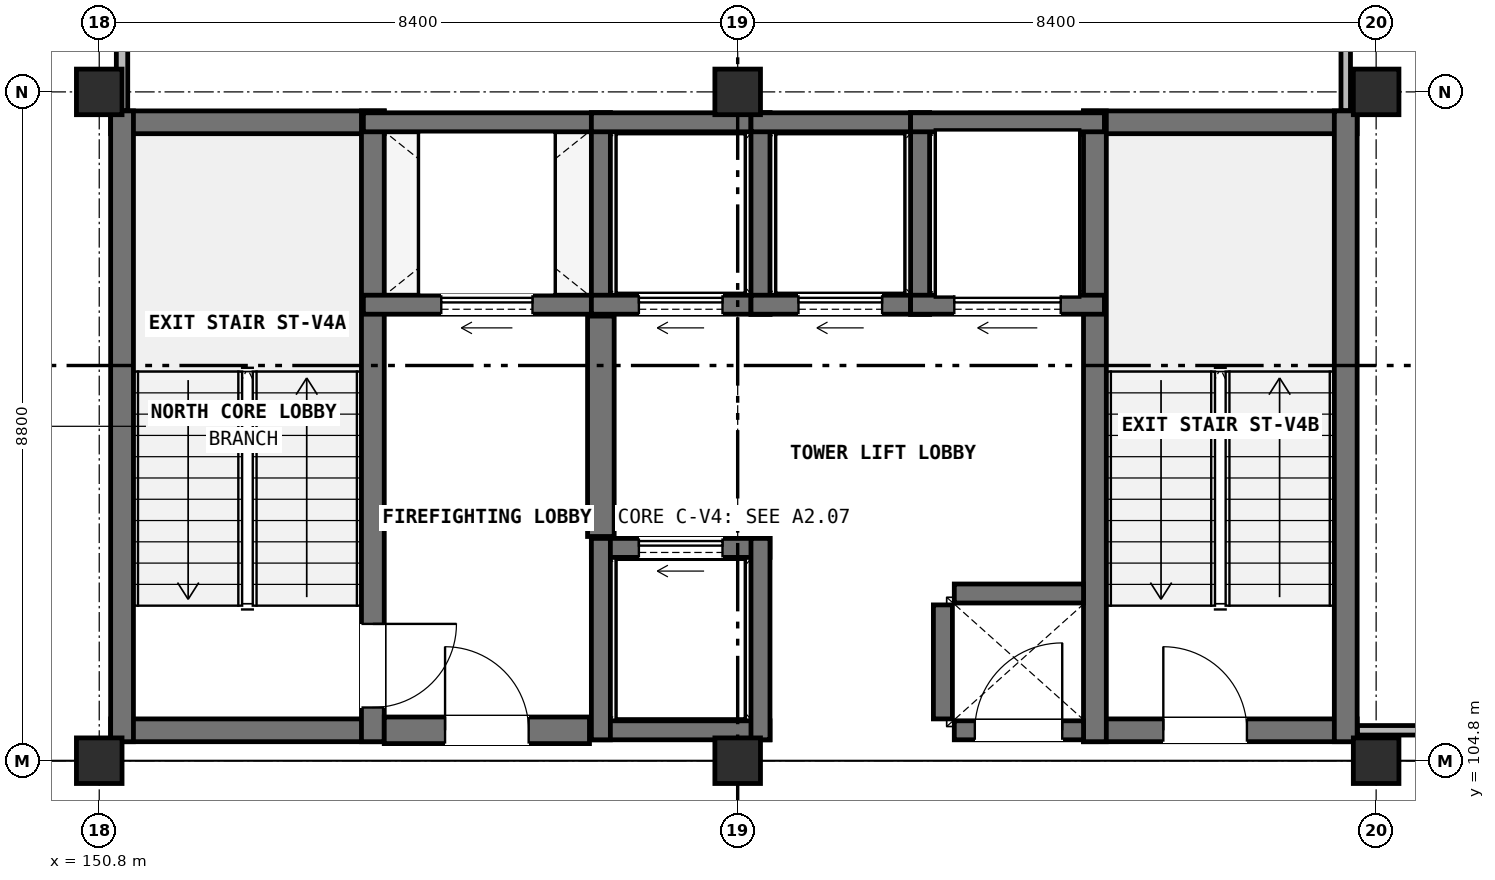
"""IFC4 building model, lengths in metres.
Left out: names, types, materials, properties, quantities, classifications, styles, units other than length and angle.
Written with IfcOpenShell. Run it as: python <this file> out.ifc"""

import sys

from ifc_helpers import new_model, si_unit, direction, frame, frame_2d, origin, origin_2d, place, context, subcontext, project, spatial, rectangle, extrude, element, fill, save


model = new_model("IFC4")
c1 = context("Model", 3, precision=1e-05, world=origin(), true_north=direction((0.0, 1.0)))
c2 = subcontext(c1, "Body", "Model", "MODEL_VIEW")
j1 = project(units=[si_unit("LENGTHUNIT", "METRE"), si_unit("PLANEANGLEUNIT", "RADIAN")], contexts=[c1])
p1 = place(None, origin())
s1 = spatial("IfcSite", under=j1, at=p1, CompositionType="ELEMENT")
p2 = place(p1, origin())
s2 = spatial("IfcBuilding", under=s1, at=p2, CompositionType="ELEMENT")
p3 = place(p2, frame((0.0, 0.0, 48.2)))
s3 = spatial("IfcBuildingStorey", under=s2, at=p3, CompositionType="ELEMENT", Elevation=48.2)
for number, where, z_axis, x_axis in (
    (1, (150.8, 104.8, 0.0), (0.0, 0.0, 1.0), (1.0, 0.0, 0.0)),
    (2, (150.8, 113.6, 0.0), (0.0, 0.0, 1.0), (1.0, 0.0, 0.0)),
    (3, (159.2, 104.8, 0.0), (0.0, 0.0, 1.0), (1.0, 0.0, 0.0)),
    (4, (159.2, 113.6, 0.0), (0.0, 0.0, 1.0), (1.0, 0.0, 0.0)),
    (5, (167.6, 104.8, 0.0), (0.0, 0.0, 1.0), (1.0, 0.0, 0.0)),
    (6, (167.6, 113.6, 0.0), (0.0, 0.0, 1.0), (1.0, 0.0, 0.0)),
):
    element("IfcColumn", number, at=place(p3, frame(where, z_axis=z_axis, x_axis=x_axis)), inside=s3, PredefinedType="COLUMN", context=c2, shape_type="SweptSolid", body=[
        extrude(rectangle(XDim=0.6, YDim=0.6, at=origin_2d()), origin(), (0.0, 0.0, 1.0), 4.0),
    ])
for number, where, z_axis, x_axis in (
    (7, (150.95, 105.2, 0.0), (0.0, 0.0, 1.0), (1.0, 0.0, 0.0)),
    (8, (150.95, 113.2, 0.0), (0.0, 0.0, 1.0), (1.0, 0.0, 0.0)),
):
    element("IfcWall", number, at=place(p3, frame(where, z_axis=z_axis, x_axis=x_axis)), inside=s3, PredefinedType="SHEAR", context=c2, shape_type="SweptSolid", body=[
        extrude(rectangle(XDim=3.6, YDim=0.3, at=frame_2d((1.8, 0.0))), origin(), (0.0, 0.0, 1.0), 4.0),
    ])
p4 = place(p3, frame((151.1, 105.05, 0.0), z_axis=(0.0, 0.0, 1.0), x_axis=(0.0, 1.0, 0.0)))
e9 = element("IfcWall", 9, at=p4, inside=s3, PredefinedType="SHEAR", context=c2, shape_type="SweptSolid", body=[
    extrude(rectangle(XDim=8.3, YDim=0.3, at=frame_2d((4.15, 0.0))), origin(), (0.0, 0.0, 1.0), 4.0),
])
p5 = place(p3, frame((154.4, 105.05, 0.0), z_axis=(0.0, 0.0, 1.0), x_axis=(0.0, 1.0, 0.0)))
e10 = element("IfcWall", 10, at=p5, inside=s3, PredefinedType="SHEAR", context=c2, shape_type="SweptSolid", body=[
    extrude(rectangle(XDim=8.3, YDim=0.3, at=frame_2d((4.15, 0.0))), origin(), (0.0, 0.0, 1.0), 4.0),
])
p6 = place(p5, frame((0.45, 0.0, 0.0)))
e11 = element("IfcOpeningElement", 11, at=p6, cuts=e10, PredefinedType="OPENING", context=c2, shape_type="SweptSolid", body=[
    extrude(rectangle(XDim=1.1, YDim=2.2, at=frame_2d((0.55, 1.1))), frame((0.0, 0.16, 0.0), z_axis=(0.0, -1.0, 0.0), x_axis=(1.0, 0.0, 0.0)), (0.0, 0.0, 1.0), 0.32),
])
p7 = place(p3, frame((163.75, 105.2, 0.0), z_axis=(0.0, 0.0, 1.0), x_axis=(1.0, 0.0, 0.0)))
e12 = element("IfcWall", 12, at=p7, inside=s3, PredefinedType="SHEAR", context=c2, shape_type="SweptSolid", body=[
    extrude(rectangle(XDim=3.6, YDim=0.3, at=frame_2d((1.8, 0.0))), origin(), (0.0, 0.0, 1.0), 4.0),
])
p8 = place(p7, frame((1.05, 0.0, 0.0)))
e13 = element("IfcOpeningElement", 13, at=p8, cuts=e12, PredefinedType="OPENING", context=c2, shape_type="SweptSolid", body=[
    extrude(rectangle(XDim=1.1, YDim=2.2, at=frame_2d((0.55, 1.1))), frame((0.0, 0.16, 0.0), z_axis=(0.0, -1.0, 0.0), x_axis=(1.0, 0.0, 0.0)), (0.0, 0.0, 1.0), 0.32),
])
p9 = place(p3, frame((163.75, 113.2, 0.0), z_axis=(0.0, 0.0, 1.0), x_axis=(1.0, 0.0, 0.0)))
e14 = element("IfcWall", 14, at=p9, inside=s3, PredefinedType="SHEAR", context=c2, shape_type="SweptSolid", body=[
    extrude(rectangle(XDim=3.6, YDim=0.3, at=frame_2d((1.8, 0.0))), origin(), (0.0, 0.0, 1.0), 4.0),
])
for number, where, z_axis, x_axis in (
    (15, (163.9, 105.05, 0.0), (0.0, 0.0, 1.0), (0.0, 1.0, 0.0)),
    (16, (167.2, 105.05, 0.0), (0.0, 0.0, 1.0), (0.0, 1.0, 0.0)),
):
    element("IfcWall", number, at=place(p3, frame(where, z_axis=z_axis, x_axis=x_axis)), inside=s3, PredefinedType="SHEAR", context=c2, shape_type="SweptSolid", body=[
        extrude(rectangle(XDim=8.3, YDim=0.3, at=frame_2d((4.15, 0.0))), origin(), (0.0, 0.0, 1.0), 4.0),
    ])
p10 = place(p3, frame((154.275, 110.8, 0.0), z_axis=(0.0, 0.0, 1.0), x_axis=(1.0, 0.0, 0.0)))
e17 = element("IfcWall", 17, at=p10, inside=s3, PredefinedType="SOLIDWALL", context=c2, shape_type="SweptSolid", body=[
    extrude(rectangle(XDim=3.25, YDim=0.25, at=frame_2d((1.625, 0.0))), origin(), (0.0, 0.0, 1.0), 3.68),
])
p11 = place(p10, frame((1.025, 0.0, 0.0)))
e18 = element("IfcOpeningElement", 18, at=p11, cuts=e17, PredefinedType="OPENING", context=c2, shape_type="SweptSolid", body=[
    extrude(rectangle(XDim=1.2, YDim=2.2, at=frame_2d((0.6, 1.1))), frame((0.0, 0.135, 0.0), z_axis=(0.0, -1.0, 0.0), x_axis=(1.0, 0.0, 0.0)), (0.0, 0.0, 1.0), 0.27),
])
p12 = place(p3, frame((154.275, 113.2, 0.0), z_axis=(0.0, 0.0, 1.0), x_axis=(1.0, 0.0, 0.0)))
e19 = element("IfcWall", 19, at=p12, inside=s3, PredefinedType="SOLIDWALL", context=c2, shape_type="SweptSolid", body=[
    extrude(rectangle(XDim=3.25, YDim=0.25, at=frame_2d((1.625, 0.0))), origin(), (0.0, 0.0, 1.0), 3.68),
])
p13 = place(p3, frame((157.4, 110.675, 0.0), z_axis=(0.0, 0.0, 1.0), x_axis=(0.0, 1.0, 0.0)))
e20 = element("IfcWall", 20, at=p13, inside=s3, PredefinedType="SOLIDWALL", context=c2, shape_type="SweptSolid", body=[
    extrude(rectangle(XDim=2.65, YDim=0.25, at=frame_2d((1.325, 0.0))), origin(), (0.0, 0.0, 1.0), 3.68),
])
p14 = place(p3, frame((157.275, 110.8, 0.0), z_axis=(0.0, 0.0, 1.0), x_axis=(1.0, 0.0, 0.0)))
e21 = element("IfcWall", 21, at=p14, inside=s3, PredefinedType="SOLIDWALL", context=c2, shape_type="SweptSolid", body=[
    extrude(rectangle(XDim=2.35, YDim=0.25, at=frame_2d((1.175, 0.0))), origin(), (0.0, 0.0, 1.0), 3.68),
])
p15 = place(p14, frame((0.625, 0.0, 0.0)))
e22 = element("IfcOpeningElement", 22, at=p15, cuts=e21, PredefinedType="OPENING", context=c2, shape_type="SweptSolid", body=[
    extrude(rectangle(XDim=1.1, YDim=2.2, at=frame_2d((0.55, 1.1))), frame((0.0, 0.135, 0.0), z_axis=(0.0, -1.0, 0.0), x_axis=(1.0, 0.0, 0.0)), (0.0, 0.0, 1.0), 0.27),
])
p16 = place(p3, frame((157.275, 113.2, 0.0), z_axis=(0.0, 0.0, 1.0), x_axis=(1.0, 0.0, 0.0)))
e23 = element("IfcWall", 23, at=p16, inside=s3, PredefinedType="SOLIDWALL", context=c2, shape_type="SweptSolid", body=[
    extrude(rectangle(XDim=2.35, YDim=0.25, at=frame_2d((1.175, 0.0))), origin(), (0.0, 0.0, 1.0), 3.68),
])
p17 = place(p3, frame((159.5, 110.675, 0.0), z_axis=(0.0, 0.0, 1.0), x_axis=(0.0, 1.0, 0.0)))
e24 = element("IfcWall", 24, at=p17, inside=s3, PredefinedType="SOLIDWALL", context=c2, shape_type="SweptSolid", body=[
    extrude(rectangle(XDim=2.65, YDim=0.25, at=frame_2d((1.325, 0.0))), origin(), (0.0, 0.0, 1.0), 3.68),
])
p18 = place(p3, frame((159.375, 110.8, 0.0), z_axis=(0.0, 0.0, 1.0), x_axis=(1.0, 0.0, 0.0)))
e25 = element("IfcWall", 25, at=p18, inside=s3, PredefinedType="SOLIDWALL", context=c2, shape_type="SweptSolid", body=[
    extrude(rectangle(XDim=2.35, YDim=0.25, at=frame_2d((1.175, 0.0))), origin(), (0.0, 0.0, 1.0), 3.68),
])
p19 = place(p18, frame((0.625, 0.0, 0.0)))
e26 = element("IfcOpeningElement", 26, at=p19, cuts=e25, PredefinedType="OPENING", context=c2, shape_type="SweptSolid", body=[
    extrude(rectangle(XDim=1.1, YDim=2.2, at=frame_2d((0.55, 1.1))), frame((0.0, 0.135, 0.0), z_axis=(0.0, -1.0, 0.0), x_axis=(1.0, 0.0, 0.0)), (0.0, 0.0, 1.0), 0.27),
])
p20 = place(p3, frame((159.375, 113.2, 0.0), z_axis=(0.0, 0.0, 1.0), x_axis=(1.0, 0.0, 0.0)))
e27 = element("IfcWall", 27, at=p20, inside=s3, PredefinedType="SOLIDWALL", context=c2, shape_type="SweptSolid", body=[
    extrude(rectangle(XDim=2.35, YDim=0.25, at=frame_2d((1.175, 0.0))), origin(), (0.0, 0.0, 1.0), 3.68),
])
p21 = place(p3, frame((161.6, 110.675, 0.0), z_axis=(0.0, 0.0, 1.0), x_axis=(0.0, 1.0, 0.0)))
e28 = element("IfcWall", 28, at=p21, inside=s3, PredefinedType="SOLIDWALL", context=c2, shape_type="SweptSolid", body=[
    extrude(rectangle(XDim=2.65, YDim=0.25, at=frame_2d((1.325, 0.0))), origin(), (0.0, 0.0, 1.0), 3.68),
])
p22 = place(p3, frame((157.275, 105.2, 0.0), z_axis=(0.0, 0.0, 1.0), x_axis=(1.0, 0.0, 0.0)))
e29 = element("IfcWall", 29, at=p22, inside=s3, PredefinedType="SOLIDWALL", context=c2, shape_type="SweptSolid", body=[
    extrude(rectangle(XDim=2.35, YDim=0.25, at=frame_2d((1.175, 0.0))), origin(), (0.0, 0.0, 1.0), 3.68),
])
p23 = place(p3, frame((157.275, 107.6, 0.0), z_axis=(0.0, 0.0, 1.0), x_axis=(1.0, 0.0, 0.0)))
e30 = element("IfcWall", 30, at=p23, inside=s3, PredefinedType="SOLIDWALL", context=c2, shape_type="SweptSolid", body=[
    extrude(rectangle(XDim=2.35, YDim=0.25, at=frame_2d((1.175, 0.0))), origin(), (0.0, 0.0, 1.0), 3.68),
])
p24 = place(p23, frame((0.625, 0.0, 0.0)))
e31 = element("IfcOpeningElement", 31, at=p24, cuts=e30, PredefinedType="OPENING", context=c2, shape_type="SweptSolid", body=[
    extrude(rectangle(XDim=1.1, YDim=2.2, at=frame_2d((0.55, 1.1))), frame((0.0, 0.135, 0.0), z_axis=(0.0, -1.0, 0.0), x_axis=(1.0, 0.0, 0.0)), (0.0, 0.0, 1.0), 0.27),
])
for number, where, z_axis, x_axis in (
    (32, (157.4, 105.075, 0.0), (0.0, 0.0, 1.0), (0.0, 1.0, 0.0)),
    (33, (159.5, 105.075, 0.0), (0.0, 0.0, 1.0), (0.0, 1.0, 0.0)),
):
    element("IfcWall", number, at=place(p3, frame(where, z_axis=z_axis, x_axis=x_axis)), inside=s3, PredefinedType="SOLIDWALL", context=c2, shape_type="SweptSolid", body=[
        extrude(rectangle(XDim=2.65, YDim=0.25, at=frame_2d((1.325, 0.0))), origin(), (0.0, 0.0, 1.0), 3.68),
    ])
p25 = place(p3, frame((161.475, 110.8, 0.0), z_axis=(0.0, 0.0, 1.0), x_axis=(1.0, 0.0, 0.0)))
e34 = element("IfcWall", 34, at=p25, inside=s3, PredefinedType="SOLIDWALL", context=c2, shape_type="SweptSolid", body=[
    extrude(rectangle(XDim=2.55, YDim=0.25, at=frame_2d((1.275, 0.0))), origin(), (0.0, 0.0, 1.0), 3.68),
])
p26 = place(p25, frame((0.575, 0.0, 0.0)))
e35 = element("IfcOpeningElement", 35, at=p26, cuts=e34, PredefinedType="OPENING", context=c2, shape_type="SweptSolid", body=[
    extrude(rectangle(XDim=1.4, YDim=2.3, at=frame_2d((0.7, 1.15))), frame((0.0, 0.135, 0.0), z_axis=(0.0, -1.0, 0.0), x_axis=(1.0, 0.0, 0.0)), (0.0, 0.0, 1.0), 0.27),
])
p27 = place(p3, frame((161.475, 113.2, 0.0), z_axis=(0.0, 0.0, 1.0), x_axis=(1.0, 0.0, 0.0)))
e36 = element("IfcWall", 36, at=p27, inside=s3, PredefinedType="SOLIDWALL", context=c2, shape_type="SweptSolid", body=[
    extrude(rectangle(XDim=2.55, YDim=0.25, at=frame_2d((1.275, 0.0))), origin(), (0.0, 0.0, 1.0), 3.68),
])
p28 = place(p3, frame((157.4, 107.75, 0.0), z_axis=(0.0, 0.0, 1.0), x_axis=(0.0, 1.0, 0.0)))
e37 = element("IfcWall", 37, at=p28, inside=s3, PredefinedType="SHEAR", context=c2, shape_type="SweptSolid", body=[
    extrude(rectangle(XDim=2.9, YDim=0.35, at=frame_2d((1.45, 0.0))), origin(), (0.0, 0.0, 1.0), 3.68),
])
p29 = place(p3, frame((154.55, 105.2, 0.0), z_axis=(0.0, 0.0, 1.0), x_axis=(1.0, 0.0, 0.0)))
e38 = element("IfcWall", 38, at=p29, inside=s3, PredefinedType="SHEAR", context=c2, shape_type="SweptSolid", body=[
    extrude(rectangle(XDim=2.7, YDim=0.35, at=frame_2d((1.35, 0.0))), origin(), (0.0, 0.0, 1.0), 3.68),
])
p30 = place(p29, frame((0.8, 0.0, 0.0)))
e39 = element("IfcOpeningElement", 39, at=p30, cuts=e38, PredefinedType="OPENING", context=c2, shape_type="SweptSolid", body=[
    extrude(rectangle(XDim=1.1, YDim=2.2, at=frame_2d((0.55, 1.1))), frame((0.0, 0.185, 0.0), z_axis=(0.0, -1.0, 0.0), x_axis=(1.0, 0.0, 0.0)), (0.0, 0.0, 1.0), 0.37),
])
p31 = place(p3, frame((161.9, 105.35, 0.0), z_axis=(0.0, 0.0, 1.0), x_axis=(0.0, 1.0, 0.0)))
e40 = element("IfcWall", 40, at=p31, inside=s3, PredefinedType="SOLIDWALL", context=c2, shape_type="SweptSolid", body=[
    extrude(rectangle(XDim=1.5, YDim=0.25, at=frame_2d((0.75, 0.0))), origin(), (0.0, 0.0, 1.0), 3.68),
])
p32 = place(p3, frame((162.05, 107.0, 0.0), z_axis=(0.0, 0.0, 1.0), x_axis=(1.0, 0.0, 0.0)))
e41 = element("IfcWall", 41, at=p32, inside=s3, PredefinedType="SOLIDWALL", context=c2, shape_type="SweptSolid", body=[
    extrude(rectangle(XDim=1.7, YDim=0.25, at=frame_2d((0.85, 0.0))), origin(), (0.0, 0.0, 1.0), 3.68),
])
p33 = place(p3, frame((162.05, 105.2, 0.0), z_axis=(0.0, 0.0, 1.0), x_axis=(1.0, 0.0, 0.0)))
e42 = element("IfcWall", 42, at=p33, inside=s3, PredefinedType="SOLIDWALL", context=c2, shape_type="SweptSolid", body=[
    extrude(rectangle(XDim=1.7, YDim=0.25, at=frame_2d((0.85, 0.0))), origin(), (0.0, 0.0, 1.0), 3.68),
])
p34 = place(p33, frame((0.27, 0.0, 0.0)))
e43 = element("IfcOpeningElement", 43, at=p34, cuts=e42, PredefinedType="OPENING", context=c2, shape_type="SweptSolid", body=[
    extrude(rectangle(XDim=1.15, YDim=2.2, at=frame_2d((0.575, 1.1))), frame((0.0, 0.135, 0.0), z_axis=(0.0, -1.0, 0.0), x_axis=(1.0, 0.0, 0.0)), (0.0, 0.0, 1.0), 0.27),
])
p35 = place(p3, frame((167.355, 105.2, 0.0), z_axis=(0.0, 0.0, 1.0), x_axis=(1.0, 0.0, 0.0)))
e44 = element("IfcWall", 44, at=p35, inside=s3, PredefinedType="PARTITIONING", context=c2, shape_type="SweptSolid", body=[
    extrude(rectangle(XDim=4.245, YDim=0.125, at=frame_2d((2.123, 0.0))), origin(), (0.0, 0.0, 1.0), 3.245),
])
p36 = place(p35, frame((1.633, 0.0, 0.0)))
e45 = element("IfcOpeningElement", 45, at=p36, cuts=e44, PredefinedType="OPENING", context=c2, shape_type="SweptSolid", body=[
    extrude(rectangle(XDim=0.98, YDim=2.1, at=frame_2d((0.49, 1.05))), frame((0.0, 0.073, 0.0), z_axis=(0.0, -1.0, 0.0), x_axis=(1.0, 0.0, 0.0)), (0.0, 0.0, 1.0), 0.145),
])
p37 = place(p3, frame((151.1, 113.355, 0.0), z_axis=(0.0, 0.0, 1.0), x_axis=(0.0, 1.0, 0.0)))
e46 = element("IfcWall", 46, at=p37, inside=s3, PredefinedType="PARTITIONING", context=c2, shape_type="SweptSolid", body=[
    extrude(rectangle(XDim=6.045, YDim=0.15, at=frame_2d((3.022, 0.0))), origin(), (0.0, 0.0, 1.0), 3.245),
])
p38 = place(p37, frame((2.143, 0.0, 0.0)))
e47 = element("IfcOpeningElement", 47, at=p38, cuts=e46, PredefinedType="OPENING", context=c2, shape_type="SweptSolid", body=[
    extrude(rectangle(XDim=1.76, YDim=2.36, at=frame_2d((0.88, 1.18))), frame((0.0, 0.085, 0.0), z_axis=(0.0, -1.0, 0.0), x_axis=(1.0, 0.0, 0.0)), (0.0, 0.0, 1.0), 0.17),
])
p39 = place(p3, frame((167.2, 113.355, 0.0), z_axis=(0.0, 0.0, 1.0), x_axis=(0.0, 1.0, 0.0)))
e48 = element("IfcWall", 48, at=p39, inside=s3, PredefinedType="PARTITIONING", context=c2, shape_type="SweptSolid", body=[
    extrude(rectangle(XDim=8.89, YDim=0.125, at=frame_2d((4.445, 0.0))), origin(), (0.0, 0.0, 1.0), 3.245),
])
p40 = place(p6, frame((1.1, 0.0, 0.0), z_axis=(0.0, 0.0, 1.0), x_axis=(-1.0, 0.0, 0.0)))
e49 = element("IfcDoor", 49, at=p40, inside=s3, OperationType="SINGLE_SWING_RIGHT", PredefinedType="DOOR", context=c2, shape_type="SweptSolid", body=[
    extrude(rectangle(XDim=1.1, YDim=2.2, at=frame_2d((0.55, 1.1))), frame((0.0, 0.025, 0.0), z_axis=(0.0, -1.0, 0.0), x_axis=(1.0, 0.0, 0.0)), (0.0, 0.0, 1.0), 0.05),
])
fill(e11, e49)
p41 = place(p8, origin())
e50 = element("IfcDoor", 50, at=p41, inside=s3, OperationType="SINGLE_SWING_LEFT", PredefinedType="DOOR", context=c2, shape_type="SweptSolid", body=[
    extrude(rectangle(XDim=1.1, YDim=2.2, at=frame_2d((0.55, 1.1))), frame((0.0, 0.025, 0.0), z_axis=(0.0, -1.0, 0.0), x_axis=(1.0, 0.0, 0.0)), (0.0, 0.0, 1.0), 0.05),
])
fill(e13, e50)
p42 = place(p11, origin())
e51 = element("IfcDoor", 51, at=p42, inside=s3, OperationType="SLIDING_TO_LEFT", PredefinedType="DOOR", context=c2, shape_type="SweptSolid", body=[
    extrude(rectangle(XDim=1.2, YDim=2.2, at=frame_2d((0.6, 1.1))), frame((0.0, 0.025, 0.0), z_axis=(0.0, -1.0, 0.0), x_axis=(1.0, 0.0, 0.0)), (0.0, 0.0, 1.0), 0.05),
])
fill(e18, e51)
p43 = place(p15, origin())
e52 = element("IfcDoor", 52, at=p43, inside=s3, OperationType="SLIDING_TO_LEFT", PredefinedType="DOOR", context=c2, shape_type="SweptSolid", body=[
    extrude(rectangle(XDim=1.1, YDim=2.2, at=frame_2d((0.55, 1.1))), frame((0.0, 0.025, 0.0), z_axis=(0.0, -1.0, 0.0), x_axis=(1.0, 0.0, 0.0)), (0.0, 0.0, 1.0), 0.05),
])
fill(e22, e52)
p44 = place(p19, origin())
e53 = element("IfcDoor", 53, at=p44, inside=s3, OperationType="SLIDING_TO_LEFT", PredefinedType="DOOR", context=c2, shape_type="SweptSolid", body=[
    extrude(rectangle(XDim=1.1, YDim=2.2, at=frame_2d((0.55, 1.1))), frame((0.0, 0.025, 0.0), z_axis=(0.0, -1.0, 0.0), x_axis=(1.0, 0.0, 0.0)), (0.0, 0.0, 1.0), 0.05),
])
fill(e26, e53)
p45 = place(p24, origin())
e54 = element("IfcDoor", 54, at=p45, inside=s3, OperationType="SLIDING_TO_LEFT", PredefinedType="DOOR", context=c2, shape_type="SweptSolid", body=[
    extrude(rectangle(XDim=1.1, YDim=2.2, at=frame_2d((0.55, 1.1))), frame((0.0, 0.025, 0.0), z_axis=(0.0, -1.0, 0.0), x_axis=(1.0, 0.0, 0.0)), (0.0, 0.0, 1.0), 0.05),
])
fill(e31, e54)
p46 = place(p26, origin())
e55 = element("IfcDoor", 55, at=p46, inside=s3, OperationType="SLIDING_TO_LEFT", PredefinedType="DOOR", context=c2, shape_type="SweptSolid", body=[
    extrude(rectangle(XDim=1.4, YDim=2.3, at=frame_2d((0.7, 1.15))), frame((0.0, 0.025, 0.0), z_axis=(0.0, -1.0, 0.0), x_axis=(1.0, 0.0, 0.0)), (0.0, 0.0, 1.0), 0.05),
])
fill(e35, e55)
p47 = place(p30, origin())
e56 = element("IfcDoor", 56, at=p47, inside=s3, OperationType="SINGLE_SWING_LEFT", PredefinedType="DOOR", context=c2, shape_type="SweptSolid", body=[
    extrude(rectangle(XDim=1.1, YDim=2.2, at=frame_2d((0.55, 1.1))), frame((0.0, 0.025, 0.0), z_axis=(0.0, -1.0, 0.0), x_axis=(1.0, 0.0, 0.0)), (0.0, 0.0, 1.0), 0.05),
])
fill(e39, e56)
p48 = place(p34, origin())
e57 = element("IfcDoor", 57, at=p48, inside=s3, OperationType="SINGLE_SWING_RIGHT", PredefinedType="DOOR", context=c2, shape_type="SweptSolid", body=[
    extrude(rectangle(XDim=1.15, YDim=2.2, at=frame_2d((0.575, 1.1))), frame((0.0, 0.025, 0.0), z_axis=(0.0, -1.0, 0.0), x_axis=(1.0, 0.0, 0.0)), (0.0, 0.0, 1.0), 0.05),
])
fill(e43, e57)
save(model, sys.argv[1])
